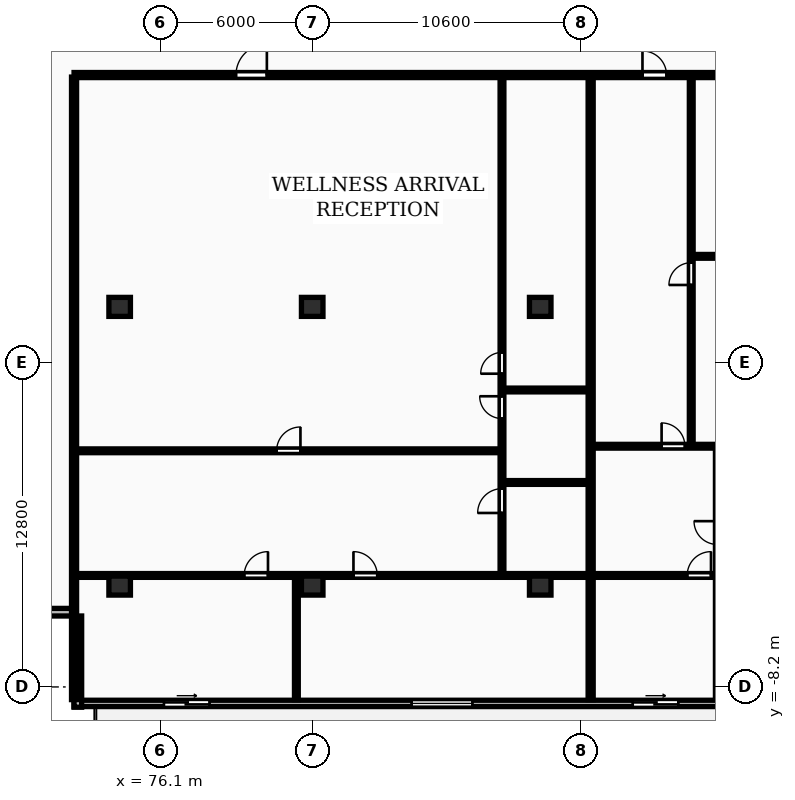
"""IFC4 building model, lengths in metres.
Left out: names, types, materials, properties, quantities, classifications, styles, units other than length and angle.
Written with IfcOpenShell. Run it as: python <this file> out.ifc"""

import sys

from ifc_helpers import new_model, si_unit, direction, frame, frame_2d, origin, origin_2d, place, context, subcontext, project, spatial, rectangle, extrude, element, fill, save


model = new_model("IFC4")
c1 = context("Model", 3, precision=1e-05, world=origin(), true_north=direction((0.0, 1.0)))
c2 = subcontext(c1, "Body", "Model", "MODEL_VIEW")
j1 = project(units=[si_unit("LENGTHUNIT", "METRE"), si_unit("PLANEANGLEUNIT", "RADIAN")], contexts=[c1])
p1 = place(None, origin())
s1 = spatial("IfcSite", under=j1, at=p1, CompositionType="ELEMENT")
p2 = place(p1, origin())
s2 = spatial("IfcBuilding", under=s1, at=p2, CompositionType="ELEMENT")
p3 = place(p2, frame((0.0, 0.0, 119.8)))
s3 = spatial("IfcBuildingStorey", under=s2, at=p3, CompositionType="ELEMENT", Elevation=119.8)
for number, where, z_axis, x_axis in (
    (1, (74.5, -4.2, 0.0), (0.0, 0.0, 1.0), (1.0, 0.0, 0.0)),
    (2, (74.5, 6.8, 0.0), (0.0, 0.0, 1.0), (1.0, 0.0, 0.0)),
    (3, (82.1, -4.2, 0.0), (0.0, 0.0, 1.0), (1.0, 0.0, 0.0)),
    (4, (82.1, 6.8, 0.0), (0.0, 0.0, 1.0), (1.0, 0.0, 0.0)),
    (5, (91.1, -4.2, 0.0), (0.0, 0.0, 1.0), (1.0, 0.0, 0.0)),
    (6, (91.1, 6.8, 0.0), (0.0, 0.0, 1.0), (1.0, 0.0, 0.0)),
):
    element("IfcColumn", number, at=place(p3, frame(where, z_axis=z_axis, x_axis=x_axis)), inside=s3, PredefinedType="COLUMN", context=c2, shape_type="SweptSolid", body=[
        extrude(rectangle(XDim=0.85, YDim=0.75, at=origin_2d()), origin(), (0.0, 0.0, 1.0), 3.25),
    ])
p4 = place(p3, frame((72.7, -8.85, 0.0), z_axis=(0.0, 0.0, 1.0), x_axis=(1.0, 0.0, 0.0)))
e7 = element("IfcWall", 7, at=p4, inside=s3, PredefinedType="STANDARD", context=c2, shape_type="SweptSolid", body=[
    extrude(rectangle(XDim=58.0, YDim=0.25, at=frame_2d((29.0, 0.0))), origin(), (0.0, 0.0, 1.0), 2.97),
])
p5 = place(p4, frame((3.548, 0.0, 0.0)))
e8 = element("IfcOpeningElement", 8, at=p5, cuts=e7, PredefinedType="OPENING", context=c2, shape_type="SweptSolid", body=[
    extrude(rectangle(XDim=1.8, YDim=2.2, at=frame_2d((0.9, 1.1))), frame((0.0, 0.135, 0.0), z_axis=(0.0, -1.0, 0.0), x_axis=(1.0, 0.0, 0.0)), (0.0, 0.0, 1.0), 0.27),
])
p6 = place(p4, frame((13.323, 0.0, 0.85)))
e9 = element("IfcOpeningElement", 9, at=p6, cuts=e7, PredefinedType="OPENING", context=c2, shape_type="SweptSolid", body=[
    extrude(rectangle(XDim=2.4, YDim=1.9, at=frame_2d((1.2, 0.95))), frame((0.0, 0.135, 0.0), z_axis=(0.0, -1.0, 0.0), x_axis=(1.0, 0.0, 0.0)), (0.0, 0.0, 1.0), 0.27),
])
p7 = place(p4, frame((26.598, 0.0, 0.85)))
e10 = element("IfcOpeningElement", 10, at=p7, cuts=e7, PredefinedType="OPENING", context=c2, shape_type="SweptSolid", body=[
    extrude(rectangle(XDim=2.4, YDim=1.9, at=frame_2d((1.2, 0.95))), frame((0.0, 0.135, 0.0), z_axis=(0.0, -1.0, 0.0), x_axis=(1.0, 0.0, 0.0)), (0.0, 0.0, 1.0), 0.27),
])
p8 = place(p4, frame((31.163, 0.0, 0.85)))
e11 = element("IfcOpeningElement", 11, at=p8, cuts=e7, PredefinedType="OPENING", context=c2, shape_type="SweptSolid", body=[
    extrude(rectangle(XDim=2.4, YDim=1.9, at=frame_2d((1.2, 0.95))), frame((0.0, 0.135, 0.0), z_axis=(0.0, -1.0, 0.0), x_axis=(1.0, 0.0, 0.0)), (0.0, 0.0, 1.0), 0.27),
])
p9 = place(p4, frame((22.051, 0.0, 0.0)))
e12 = element("IfcOpeningElement", 12, at=p9, cuts=e7, PredefinedType="OPENING", context=c2, shape_type="SweptSolid", body=[
    extrude(rectangle(XDim=1.8, YDim=2.2, at=frame_2d((0.9, 1.1))), frame((0.0, 0.135, 0.0), z_axis=(0.0, -1.0, 0.0), x_axis=(1.0, 0.0, 0.0)), (0.0, 0.0, 1.0), 0.27),
])
p10 = place(p4, frame((35.861, 0.0, 0.85)))
e13 = element("IfcOpeningElement", 13, at=p10, cuts=e7, PredefinedType="OPENING", context=c2, shape_type="SweptSolid", body=[
    extrude(rectangle(XDim=2.4, YDim=1.9, at=frame_2d((1.2, 0.95))), frame((0.0, 0.135, 0.0), z_axis=(0.0, -1.0, 0.0), x_axis=(1.0, 0.0, 0.0)), (0.0, 0.0, 1.0), 0.27),
])
p11 = place(p4, frame((49.165, 0.0, 0.85)))
e14 = element("IfcOpeningElement", 14, at=p11, cuts=e7, PredefinedType="OPENING", context=c2, shape_type="SweptSolid", body=[
    extrude(rectangle(XDim=2.4, YDim=1.9, at=frame_2d((1.2, 0.95))), frame((0.0, 0.135, 0.0), z_axis=(0.0, -1.0, 0.0), x_axis=(1.0, 0.0, 0.0)), (0.0, 0.0, 1.0), 0.27),
])
p12 = place(p4, frame((42.661, 0.0, 0.0)))
e15 = element("IfcOpeningElement", 15, at=p12, cuts=e7, PredefinedType="OPENING", context=c2, shape_type="SweptSolid", body=[
    extrude(rectangle(XDim=1.8, YDim=2.2, at=frame_2d((0.9, 1.1))), frame((0.0, 0.135, 0.0), z_axis=(0.0, -1.0, 0.0), x_axis=(1.0, 0.0, 0.0)), (0.0, 0.0, 1.0), 0.27),
])
p13 = place(p4, frame((54.465, 0.0, 0.85)))
e16 = element("IfcOpeningElement", 16, at=p13, cuts=e7, PredefinedType="OPENING", context=c2, shape_type="SweptSolid", body=[
    extrude(rectangle(XDim=2.4, YDim=1.9, at=frame_2d((1.2, 0.95))), frame((0.0, 0.135, 0.0), z_axis=(0.0, -1.0, 0.0), x_axis=(1.0, 0.0, 0.0)), (0.0, 0.0, 1.0), 0.27),
])
p14 = place(p3, frame((69.1, -5.25, 0.0), z_axis=(0.0, 0.0, 1.0), x_axis=(1.0, 0.0, 0.0)))
e17 = element("IfcWall", 17, at=p14, inside=s3, PredefinedType="STANDARD", context=c2, shape_type="SweptSolid", body=[
    extrude(rectangle(XDim=3.6, YDim=0.3, at=frame_2d((1.8, 0.0))), origin(), (0.0, 0.0, 1.0), 2.97),
])
p15 = place(p3, frame((72.85, -5.4, 0.0), z_axis=(0.0, 0.0, 1.0), x_axis=(0.0, -1.0, 0.0)))
e18 = element("IfcWall", 18, at=p15, inside=s3, PredefinedType="STANDARD", context=c2, shape_type="SweptSolid", body=[
    extrude(rectangle(XDim=3.6, YDim=0.3, at=frame_2d((1.8, 0.0))), origin(), (0.0, 0.0, 1.0), 2.97),
])
for number, where, z_axis, x_axis in (
    (19, (72.7, -8.7, 0.0), (0.0, 0.0, 1.0), (0.0, 1.0, 0.0)),
    (20, (93.091, -8.7, 0.0), (0.0, 0.0, 1.0), (0.0, 1.0, 0.0)),
):
    element("IfcWall", number, at=place(p3, frame(where, z_axis=z_axis, x_axis=x_axis)), inside=s3, PredefinedType="PARTITIONING", context=c2, shape_type="SweptSolid", body=[
        extrude(rectangle(XDim=24.57, YDim=0.2, at=frame_2d((12.285, 0.0))), origin(), (0.0, 0.0, 1.0), 2.97),
    ])
p16 = place(p3, frame((72.78, 1.12, 0.0), z_axis=(0.0, 0.0, 1.0), x_axis=(1.0, 0.0, 0.0)))
e21 = element("IfcWall", 21, at=p16, inside=s3, PredefinedType="PARTITIONING", context=c2, shape_type="SweptSolid", body=[
    extrude(rectangle(XDim=16.771, YDim=0.15, at=frame_2d((8.385, 0.0))), origin(), (0.0, 0.0, 1.0), 2.97),
])
p17 = place(p16, frame((7.915, 0.0, 0.0)))
e22 = element("IfcOpeningElement", 22, at=p17, cuts=e21, PredefinedType="OPENING", context=c2, shape_type="SweptSolid", body=[
    extrude(rectangle(XDim=0.94, YDim=2.1, at=frame_2d((0.47, 1.05))), frame((0.0, 0.085, 0.0), z_axis=(0.0, -1.0, 0.0), x_axis=(1.0, 0.0, 0.0)), (0.0, 0.0, 1.0), 0.17),
])
for number, where, z_axis, x_axis in (
    (23, (89.651, -0.13, 0.0), (0.0, 0.0, 1.0), (1.0, 0.0, 0.0)),
    (24, (89.651, 3.52, 0.0), (0.0, 0.0, 1.0), (1.0, 0.0, 0.0)),
):
    element("IfcWall", number, at=place(p3, frame(where, z_axis=z_axis, x_axis=x_axis)), inside=s3, PredefinedType="PARTITIONING", context=c2, shape_type="SweptSolid", body=[
        extrude(rectangle(XDim=3.36, YDim=0.15, at=frame_2d((1.68, 0.0))), origin(), (0.0, 0.0, 1.0), 2.97),
    ])
p18 = place(p3, frame((89.591, -3.74, 0.0), z_axis=(0.0, 0.0, 1.0), x_axis=(0.0, 1.0, 0.0)))
e25 = element("IfcWall", 25, at=p18, inside=s3, PredefinedType="PARTITIONING", context=c2, shape_type="SweptSolid", body=[
    extrude(rectangle(XDim=19.63, YDim=0.15, at=frame_2d((9.815, 0.0))), origin(), (0.0, 0.0, 1.0), 2.97),
])
p19 = place(p18, frame((2.406, 0.0, 0.0)))
e26 = element("IfcOpeningElement", 26, at=p19, cuts=e25, PredefinedType="OPENING", context=c2, shape_type="SweptSolid", body=[
    extrude(rectangle(XDim=0.96, YDim=2.1, at=frame_2d((0.48, 1.05))), frame((0.0, 0.085, 0.0), z_axis=(0.0, -1.0, 0.0), x_axis=(1.0, 0.0, 0.0)), (0.0, 0.0, 1.0), 0.17),
])
p20 = place(p18, frame((6.133, 0.0, 0.0)))
e27 = element("IfcOpeningElement", 27, at=p20, cuts=e25, PredefinedType="OPENING", context=c2, shape_type="SweptSolid", body=[
    extrude(rectangle(XDim=0.88, YDim=2.06, at=frame_2d((0.44, 1.03))), frame((0.0, 0.085, 0.0), z_axis=(0.0, -1.0, 0.0), x_axis=(1.0, 0.0, 0.0)), (0.0, 0.0, 1.0), 0.17),
])
p21 = place(p18, frame((7.903, 0.0, 0.0)))
e28 = element("IfcOpeningElement", 28, at=p21, cuts=e25, PredefinedType="OPENING", context=c2, shape_type="SweptSolid", body=[
    extrude(rectangle(XDim=0.84, YDim=2.04, at=frame_2d((0.42, 1.02))), frame((0.0, 0.085, 0.0), z_axis=(0.0, -1.0, 0.0), x_axis=(1.0, 0.0, 0.0)), (0.0, 0.0, 1.0), 0.17),
])
p22 = place(p3, frame((81.475, -8.7, 0.0), z_axis=(0.0, 0.0, 1.0), x_axis=(0.0, 1.0, 0.0)))
e29 = element("IfcWall", 29, at=p22, inside=s3, PredefinedType="PARTITIONING", context=c2, shape_type="SweptSolid", body=[
    extrude(rectangle(XDim=4.82, YDim=0.15, at=frame_2d((2.41, 0.0))), origin(), (0.0, 0.0, 1.0), 2.97),
])
p23 = place(p3, frame((72.78, -3.8, 0.0), z_axis=(0.0, 0.0, 1.0), x_axis=(1.0, 0.0, 0.0)))
e30 = element("IfcWall", 30, at=p23, inside=s3, PredefinedType="PARTITIONING", context=c2, shape_type="SweptSolid", body=[
    extrude(rectangle(XDim=20.231, YDim=0.15, at=frame_2d((10.115, 0.0))), origin(), (0.0, 0.0, 1.0), 2.97),
])
p24 = place(p23, frame((6.635, 0.0, 0.0)))
e31 = element("IfcOpeningElement", 31, at=p24, cuts=e30, PredefinedType="OPENING", context=c2, shape_type="SweptSolid", body=[
    extrude(rectangle(XDim=0.94, YDim=2.1, at=frame_2d((0.47, 1.05))), frame((0.0, 0.085, 0.0), z_axis=(0.0, -1.0, 0.0), x_axis=(1.0, 0.0, 0.0)), (0.0, 0.0, 1.0), 0.17),
])
p25 = place(p23, frame((10.948, 0.0, 0.0)))
e32 = element("IfcOpeningElement", 32, at=p25, cuts=e30, PredefinedType="OPENING", context=c2, shape_type="SweptSolid", body=[
    extrude(rectangle(XDim=0.94, YDim=2.1, at=frame_2d((0.47, 1.05))), frame((0.0, 0.085, 0.0), z_axis=(0.0, -1.0, 0.0), x_axis=(1.0, 0.0, 0.0)), (0.0, 0.0, 1.0), 0.17),
])
p26 = place(p3, frame((97.121, 8.795, 0.0), z_axis=(0.0, 0.0, 1.0), x_axis=(1.0, 0.0, 0.0)))
e33 = element("IfcWall", 33, at=p26, inside=s3, PredefinedType="PARTITIONING", context=c2, shape_type="SweptSolid", body=[
    extrude(rectangle(XDim=15.222, YDim=0.15, at=frame_2d((7.611, 0.0))), origin(), (0.0, 0.0, 1.0), 2.97),
])
p27 = place(p26, frame((6.27, 0.0, 0.0)))
e34 = element("IfcOpeningElement", 34, at=p27, cuts=e33, PredefinedType="OPENING", context=c2, shape_type="SweptSolid", body=[
    extrude(rectangle(XDim=0.88, YDim=2.06, at=frame_2d((0.44, 1.03))), frame((0.0, 0.085, 0.0), z_axis=(0.0, -1.0, 0.0), x_axis=(1.0, 0.0, 0.0)), (0.0, 0.0, 1.0), 0.17),
])
p28 = place(p3, frame((97.061, 1.34, 0.0), z_axis=(0.0, 0.0, 1.0), x_axis=(0.0, 1.0, 0.0)))
e35 = element("IfcWall", 35, at=p28, inside=s3, PredefinedType="PARTITIONING", context=c2, shape_type="SweptSolid", body=[
    extrude(rectangle(XDim=14.55, YDim=0.15, at=frame_2d((7.275, 0.0))), origin(), (0.0, 0.0, 1.0), 2.97),
])
p29 = place(p28, frame((6.325, 0.0, 0.0)))
e36 = element("IfcOpeningElement", 36, at=p29, cuts=e35, PredefinedType="OPENING", context=c2, shape_type="SweptSolid", body=[
    extrude(rectangle(XDim=0.88, YDim=2.06, at=frame_2d((0.44, 1.03))), frame((0.0, 0.085, 0.0), z_axis=(0.0, -1.0, 0.0), x_axis=(1.0, 0.0, 0.0)), (0.0, 0.0, 1.0), 0.17),
])
p30 = place(p3, frame((93.171, 1.3, 0.0), z_axis=(0.0, 0.0, 1.0), x_axis=(1.0, 0.0, 0.0)))
e37 = element("IfcWall", 37, at=p30, inside=s3, PredefinedType="PARTITIONING", context=c2, shape_type="SweptSolid", body=[
    extrude(rectangle(XDim=19.172, YDim=0.15, at=frame_2d((9.586, 0.0))), origin(), (0.0, 0.0, 1.0), 2.97),
])
p31 = place(p30, frame((2.72, 0.0, 0.0)))
e38 = element("IfcOpeningElement", 38, at=p31, cuts=e37, PredefinedType="OPENING", context=c2, shape_type="SweptSolid", body=[
    extrude(rectangle(XDim=0.92, YDim=2.08, at=frame_2d((0.46, 1.04))), frame((0.0, 0.085, 0.0), z_axis=(0.0, -1.0, 0.0), x_axis=(1.0, 0.0, 0.0)), (0.0, 0.0, 1.0), 0.17),
])
p32 = place(p3, frame((93.171, -3.8, 0.0), z_axis=(0.0, 0.0, 1.0), x_axis=(1.0, 0.0, 0.0)))
e39 = element("IfcWall", 39, at=p32, inside=s3, PredefinedType="PARTITIONING", context=c2, shape_type="SweptSolid", body=[
    extrude(rectangle(XDim=14.049, YDim=0.15, at=frame_2d((7.024, 0.0))), origin(), (0.0, 0.0, 1.0), 2.97),
])
p33 = place(p32, frame((3.73, 0.0, 0.0)))
e40 = element("IfcOpeningElement", 40, at=p33, cuts=e39, PredefinedType="OPENING", context=c2, shape_type="SweptSolid", body=[
    extrude(rectangle(XDim=0.94, YDim=2.1, at=frame_2d((0.47, 1.05))), frame((0.0, 0.085, 0.0), z_axis=(0.0, -1.0, 0.0), x_axis=(1.0, 0.0, 0.0)), (0.0, 0.0, 1.0), 0.17),
])
p34 = place(p32, frame((8.565, 0.0, 0.0)))
e41 = element("IfcOpeningElement", 41, at=p34, cuts=e39, PredefinedType="OPENING", context=c2, shape_type="SweptSolid", body=[
    extrude(rectangle(XDim=0.88, YDim=2.06, at=frame_2d((0.44, 1.03))), frame((0.0, 0.085, 0.0), z_axis=(0.0, -1.0, 0.0), x_axis=(1.0, 0.0, 0.0)), (0.0, 0.0, 1.0), 0.17),
])
p35 = place(p32, frame((10.014, 0.0, 0.0)))
e42 = element("IfcOpeningElement", 42, at=p35, cuts=e39, PredefinedType="OPENING", context=c2, shape_type="SweptSolid", body=[
    extrude(rectangle(XDim=0.88, YDim=2.06, at=frame_2d((0.44, 1.03))), frame((0.0, 0.085, 0.0), z_axis=(0.0, -1.0, 0.0), x_axis=(1.0, 0.0, 0.0)), (0.0, 0.0, 1.0), 0.17),
])
p36 = place(p3, frame((72.7, 15.95, 0.0), z_axis=(0.0, 0.0, 1.0), x_axis=(1.0, 0.0, 0.0)))
e43 = element("IfcWall", 43, at=p36, inside=s3, PredefinedType="PARTITIONING", context=c2, shape_type="SweptSolid", body=[
    extrude(rectangle(XDim=58.0, YDim=0.2, at=frame_2d((29.0, 0.0))), origin(), (0.0, 0.0, 1.0), 2.97),
])
p37 = place(p36, frame((6.39, 0.0, 0.0)))
e44 = element("IfcOpeningElement", 44, at=p37, cuts=e43, PredefinedType="OPENING", context=c2, shape_type="SweptSolid", body=[
    extrude(rectangle(XDim=1.22, YDim=2.18, at=frame_2d((0.61, 1.09))), frame((0.0, 0.11, 0.0), z_axis=(0.0, -1.0, 0.0), x_axis=(1.0, 0.0, 0.0)), (0.0, 0.0, 1.0), 0.22),
])
p38 = place(p36, frame((22.436, 0.0, 0.0)))
e45 = element("IfcOpeningElement", 45, at=p38, cuts=e43, PredefinedType="OPENING", context=c2, shape_type="SweptSolid", body=[
    extrude(rectangle(XDim=0.95, YDim=2.15, at=frame_2d((0.475, 1.075))), frame((0.0, 0.11, 0.0), z_axis=(0.0, -1.0, 0.0), x_axis=(1.0, 0.0, 0.0)), (0.0, 0.0, 1.0), 0.22),
])
p39 = place(p36, frame((41.768, 0.0, 0.0)))
e46 = element("IfcOpeningElement", 46, at=p39, cuts=e43, PredefinedType="OPENING", context=c2, shape_type="SweptSolid", body=[
    extrude(rectangle(XDim=0.95, YDim=2.15, at=frame_2d((0.475, 1.075))), frame((0.0, 0.11, 0.0), z_axis=(0.0, -1.0, 0.0), x_axis=(1.0, 0.0, 0.0)), (0.0, 0.0, 1.0), 0.22),
])
p40 = place(p5, origin())
e47 = element("IfcDoor", 47, at=p40, inside=s3, OperationType="SLIDING_TO_RIGHT", PredefinedType="DOOR", context=c2, shape_type="SweptSolid", body=[
    extrude(rectangle(XDim=1.8, YDim=2.2, at=frame_2d((0.9, 1.1))), frame((0.0, 0.025, 0.0), z_axis=(0.0, -1.0, 0.0), x_axis=(1.0, 0.0, 0.0)), (0.0, 0.0, 1.0), 0.05),
])
fill(e8, e47)
p41 = place(p6, origin())
e48 = element("IfcWindow", 48, at=p41, inside=s3, PartitioningType="DOUBLE_PANEL_VERTICAL", PredefinedType="WINDOW", context=c2, shape_type="SweptSolid", body=[
    extrude(rectangle(XDim=2.4, YDim=1.9, at=frame_2d((1.2, 0.95))), frame((0.0, 0.03, 0.0), z_axis=(0.0, -1.0, 0.0), x_axis=(1.0, 0.0, 0.0)), (0.0, 0.0, 1.0), 0.06),
])
fill(e9, e48)
p42 = place(p9, origin())
e49 = element("IfcDoor", 49, at=p42, inside=s3, OperationType="SLIDING_TO_RIGHT", PredefinedType="DOOR", context=c2, shape_type="SweptSolid", body=[
    extrude(rectangle(XDim=1.8, YDim=2.2, at=frame_2d((0.9, 1.1))), frame((0.0, 0.025, 0.0), z_axis=(0.0, -1.0, 0.0), x_axis=(1.0, 0.0, 0.0)), (0.0, 0.0, 1.0), 0.05),
])
fill(e12, e49)
p43 = place(p17, origin())
e50 = element("IfcDoor", 50, at=p43, inside=s3, OperationType="SINGLE_SWING_RIGHT", PredefinedType="DOOR", context=c2, shape_type="SweptSolid", body=[
    extrude(rectangle(XDim=0.94, YDim=2.1, at=frame_2d((0.47, 1.05))), frame((0.0, 0.025, 0.0), z_axis=(0.0, -1.0, 0.0), x_axis=(1.0, 0.0, 0.0)), (0.0, 0.0, 1.0), 0.05),
])
fill(e22, e50)
p44 = place(p19, origin())
e51 = element("IfcDoor", 51, at=p44, inside=s3, OperationType="SINGLE_SWING_LEFT", PredefinedType="DOOR", context=c2, shape_type="SweptSolid", body=[
    extrude(rectangle(XDim=0.96, YDim=2.1, at=frame_2d((0.48, 1.05))), frame((0.0, 0.025, 0.0), z_axis=(0.0, -1.0, 0.0), x_axis=(1.0, 0.0, 0.0)), (0.0, 0.0, 1.0), 0.05),
])
fill(e26, e51)
p45 = place(p20, origin())
e52 = element("IfcDoor", 52, at=p45, inside=s3, OperationType="SINGLE_SWING_RIGHT", PredefinedType="DOOR", context=c2, shape_type="SweptSolid", body=[
    extrude(rectangle(XDim=0.88, YDim=2.06, at=frame_2d((0.44, 1.03))), frame((0.0, 0.025, 0.0), z_axis=(0.0, -1.0, 0.0), x_axis=(1.0, 0.0, 0.0)), (0.0, 0.0, 1.0), 0.05),
])
fill(e27, e52)
p46 = place(p21, origin())
e53 = element("IfcDoor", 53, at=p46, inside=s3, OperationType="SINGLE_SWING_LEFT", PredefinedType="DOOR", context=c2, shape_type="SweptSolid", body=[
    extrude(rectangle(XDim=0.84, YDim=2.04, at=frame_2d((0.42, 1.02))), frame((0.0, 0.025, 0.0), z_axis=(0.0, -1.0, 0.0), x_axis=(1.0, 0.0, 0.0)), (0.0, 0.0, 1.0), 0.05),
])
fill(e28, e53)
p47 = place(p24, origin())
e54 = element("IfcDoor", 54, at=p47, inside=s3, OperationType="SINGLE_SWING_RIGHT", PredefinedType="DOOR", context=c2, shape_type="SweptSolid", body=[
    extrude(rectangle(XDim=0.94, YDim=2.1, at=frame_2d((0.47, 1.05))), frame((0.0, 0.025, 0.0), z_axis=(0.0, -1.0, 0.0), x_axis=(1.0, 0.0, 0.0)), (0.0, 0.0, 1.0), 0.05),
])
fill(e31, e54)
p48 = place(p25, origin())
e55 = element("IfcDoor", 55, at=p48, inside=s3, OperationType="SINGLE_SWING_LEFT", PredefinedType="DOOR", context=c2, shape_type="SweptSolid", body=[
    extrude(rectangle(XDim=0.94, YDim=2.1, at=frame_2d((0.47, 1.05))), frame((0.0, 0.025, 0.0), z_axis=(0.0, -1.0, 0.0), x_axis=(1.0, 0.0, 0.0)), (0.0, 0.0, 1.0), 0.05),
])
fill(e32, e55)
p49 = place(p29, origin())
e56 = element("IfcDoor", 56, at=p49, inside=s3, OperationType="SINGLE_SWING_LEFT", PredefinedType="DOOR", context=c2, shape_type="SweptSolid", body=[
    extrude(rectangle(XDim=0.88, YDim=2.06, at=frame_2d((0.44, 1.03))), frame((0.0, 0.025, 0.0), z_axis=(0.0, -1.0, 0.0), x_axis=(1.0, 0.0, 0.0)), (0.0, 0.0, 1.0), 0.05),
])
fill(e36, e56)
p50 = place(p31, origin())
e57 = element("IfcDoor", 57, at=p50, inside=s3, OperationType="SINGLE_SWING_LEFT", PredefinedType="DOOR", context=c2, shape_type="SweptSolid", body=[
    extrude(rectangle(XDim=0.92, YDim=2.08, at=frame_2d((0.46, 1.04))), frame((0.0, 0.025, 0.0), z_axis=(0.0, -1.0, 0.0), x_axis=(1.0, 0.0, 0.0)), (0.0, 0.0, 1.0), 0.05),
])
fill(e38, e57)
p51 = place(p33, origin())
e58 = element("IfcDoor", 58, at=p51, inside=s3, OperationType="SINGLE_SWING_RIGHT", PredefinedType="DOOR", context=c2, shape_type="SweptSolid", body=[
    extrude(rectangle(XDim=0.94, YDim=2.1, at=frame_2d((0.47, 1.05))), frame((0.0, 0.025, 0.0), z_axis=(0.0, -1.0, 0.0), x_axis=(1.0, 0.0, 0.0)), (0.0, 0.0, 1.0), 0.05),
])
fill(e40, e58)
p52 = place(p37, origin())
e59 = element("IfcDoor", 59, at=p52, inside=s3, OperationType="SINGLE_SWING_RIGHT", PredefinedType="DOOR", context=c2, shape_type="SweptSolid", body=[
    extrude(rectangle(XDim=1.22, YDim=2.18, at=frame_2d((0.61, 1.09))), frame((0.0, 0.025, 0.0), z_axis=(0.0, -1.0, 0.0), x_axis=(1.0, 0.0, 0.0)), (0.0, 0.0, 1.0), 0.05),
])
fill(e44, e59)
p53 = place(p38, origin())
e60 = element("IfcDoor", 60, at=p53, inside=s3, OperationType="SINGLE_SWING_LEFT", PredefinedType="DOOR", context=c2, shape_type="SweptSolid", body=[
    extrude(rectangle(XDim=0.95, YDim=2.15, at=frame_2d((0.475, 1.075))), frame((0.0, 0.025, 0.0), z_axis=(0.0, -1.0, 0.0), x_axis=(1.0, 0.0, 0.0)), (0.0, 0.0, 1.0), 0.05),
])
fill(e45, e60)
save(model, sys.argv[1])
